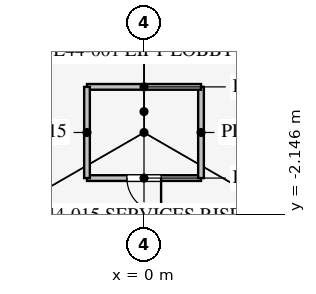
"""IFC4 building model, lengths in metres.
Left out: names, types, materials, properties, quantities, classifications, styles, units other than length and angle.
Written with IfcOpenShell. Run it as: python <this file> out.ifc"""

import sys

from ifc_helpers import new_model, si_unit, direction, frame, frame_2d, origin, place, context, subcontext, project, spatial, rectangle, extrude, element, fill, save


model = new_model("IFC4")
c1 = context("Model", 3, precision=1e-05, world=origin(), true_north=direction((0.0, 1.0)))
c2 = subcontext(c1, "Body", "Model", "MODEL_VIEW")
j1 = project(units=[si_unit("LENGTHUNIT", "METRE"), si_unit("PLANEANGLEUNIT", "RADIAN")], contexts=[c1])
p1 = place(None, origin())
s1 = spatial("IfcSite", under=j1, at=p1, CompositionType="ELEMENT")
p2 = place(p1, origin())
s2 = spatial("IfcBuilding", under=s1, at=p2, CompositionType="ELEMENT")
p3 = place(p2, frame((0.0, 0.0, 193.9)))
s3 = spatial("IfcBuildingStorey", under=s2, at=p3, CompositionType="ELEMENT", Elevation=193.9)
p4 = place(p3, frame((-1.5, -1.2, 0.0), z_axis=(0.0, 0.0, 1.0), x_axis=(1.0, 0.0, 0.0)))
e1 = element("IfcWall", 1, at=p4, inside=s3, PredefinedType="PARTITIONING", context=c2, shape_type="SweptSolid", body=[
    extrude(rectangle(XDim=3.0, YDim=0.15, at=frame_2d((1.5, 0.0))), origin(), (0.0, 0.0, 1.0), 4.0),
])
p5 = place(p4, frame((1.05, 0.0, 0.0)))
e2 = element("IfcOpeningElement", 2, at=p5, cuts=e1, PredefinedType="OPENING", context=c2, shape_type="SweptSolid", body=[
    extrude(rectangle(XDim=0.9, YDim=2.1, at=frame_2d((0.45, 1.05))), frame((0.0, 0.085, 0.0), z_axis=(0.0, -1.0, 0.0), x_axis=(1.0, 0.0, 0.0)), (0.0, 0.0, 1.0), 0.17),
])
p6 = place(p3, frame((1.5, -1.2, 0.0), z_axis=(0.0, 0.0, 1.0), x_axis=(0.0, 1.0, 0.0)))
e3 = element("IfcWall", 3, at=p6, inside=s3, PredefinedType="PARTITIONING", context=c2, shape_type="SweptSolid", body=[
    extrude(rectangle(XDim=2.4, YDim=0.15, at=frame_2d((1.2, 0.0))), origin(), (0.0, 0.0, 1.0), 4.0),
])
p7 = place(p3, frame((1.5, 1.2, 0.0), z_axis=(0.0, 0.0, 1.0), x_axis=(-1.0, 0.0, 0.0)))
e4 = element("IfcWall", 4, at=p7, inside=s3, PredefinedType="PARTITIONING", context=c2, shape_type="SweptSolid", body=[
    extrude(rectangle(XDim=3.0, YDim=0.15, at=frame_2d((1.5, 0.0))), origin(), (0.0, 0.0, 1.0), 4.0),
])
p8 = place(p3, frame((-1.5, 1.2, 0.0), z_axis=(0.0, 0.0, 1.0), x_axis=(0.0, -1.0, 0.0)))
e5 = element("IfcWall", 5, at=p8, inside=s3, PredefinedType="PARTITIONING", context=c2, shape_type="SweptSolid", body=[
    extrude(rectangle(XDim=2.4, YDim=0.15, at=frame_2d((1.2, 0.0))), origin(), (0.0, 0.0, 1.0), 4.0),
])
p9 = place(p3, frame((26.415, -15.231, 0.0), z_axis=(0.0, 0.0, 1.0), x_axis=(-0.50000091641, 0.866024874695, 0.0)))
e6 = element("IfcWall", 6, at=p9, inside=s3, PredefinedType="PARTITIONING", context=c2, shape_type="SweptSolid", body=[
    extrude(rectangle(XDim=52.796, YDim=0.12, at=frame_2d((26.398, 0.0))), origin(), (0.0, 0.0, 1.0), 2.9),
])
p10 = place(p9, frame((10.2, 0.0, 0.15)))
e7 = element("IfcOpeningElement", 7, at=p10, cuts=e6, PredefinedType="OPENING", context=c2, shape_type="SweptSolid", body=[
    extrude(rectangle(XDim=1.8, YDim=2.1, at=frame_2d((0.9, 1.05))), frame((0.0, 0.07, 0.0), z_axis=(0.0, -1.0, 0.0), x_axis=(1.0, 0.0, 0.0)), (0.0, 0.0, 1.0), 0.14),
])
p11 = place(p9, frame((40.8, 0.0, 0.15)))
e8 = element("IfcOpeningElement", 8, at=p11, cuts=e6, PredefinedType="OPENING", context=c2, shape_type="SweptSolid", body=[
    extrude(rectangle(XDim=1.8, YDim=2.1, at=frame_2d((0.9, 1.05))), frame((0.0, 0.07, 0.0), z_axis=(0.0, -1.0, 0.0), x_axis=(1.0, 0.0, 0.0)), (0.0, 0.0, 1.0), 0.14),
])
p12 = place(p3, frame((-0.016, 30.491, 0.0), z_axis=(0.0, 0.0, 1.0), x_axis=(-0.50000091641, -0.866024874695, 0.0)))
e9 = element("IfcWall", 9, at=p12, inside=s3, PredefinedType="PARTITIONING", context=c2, shape_type="SweptSolid", body=[
    extrude(rectangle(XDim=52.796, YDim=0.12, at=frame_2d((26.398, 0.0))), origin(), (0.0, 0.0, 1.0), 2.9),
])
p13 = place(p12, frame((10.2, 0.0, 0.15)))
e10 = element("IfcOpeningElement", 10, at=p13, cuts=e9, PredefinedType="OPENING", context=c2, shape_type="SweptSolid", body=[
    extrude(rectangle(XDim=1.8, YDim=2.1, at=frame_2d((0.9, 1.05))), frame((0.0, 0.07, 0.0), z_axis=(0.0, -1.0, 0.0), x_axis=(1.0, 0.0, 0.0)), (0.0, 0.0, 1.0), 0.14),
])
p14 = place(p12, frame((40.8, 0.0, 0.15)))
e11 = element("IfcOpeningElement", 11, at=p14, cuts=e9, PredefinedType="OPENING", context=c2, shape_type="SweptSolid", body=[
    extrude(rectangle(XDim=1.8, YDim=2.1, at=frame_2d((0.9, 1.05))), frame((0.0, 0.07, 0.0), z_axis=(0.0, -1.0, 0.0), x_axis=(1.0, 0.0, 0.0)), (0.0, 0.0, 1.0), 0.14),
])
p15 = place(p5, frame((0.9, 0.0, 0.0), z_axis=(0.0, 0.0, 1.0), x_axis=(-1.0, 0.0, 0.0)))
e12 = element("IfcDoor", 12, at=p15, inside=s3, OperationType="SINGLE_SWING_LEFT", PredefinedType="DOOR", context=c2, shape_type="SweptSolid", body=[
    extrude(rectangle(XDim=0.9, YDim=2.1, at=frame_2d((0.45, 1.05))), frame((0.0, 0.025, 0.0), z_axis=(0.0, -1.0, 0.0), x_axis=(1.0, 0.0, 0.0)), (0.0, 0.0, 1.0), 0.05),
])
fill(e2, e12)
save(model, sys.argv[1])
